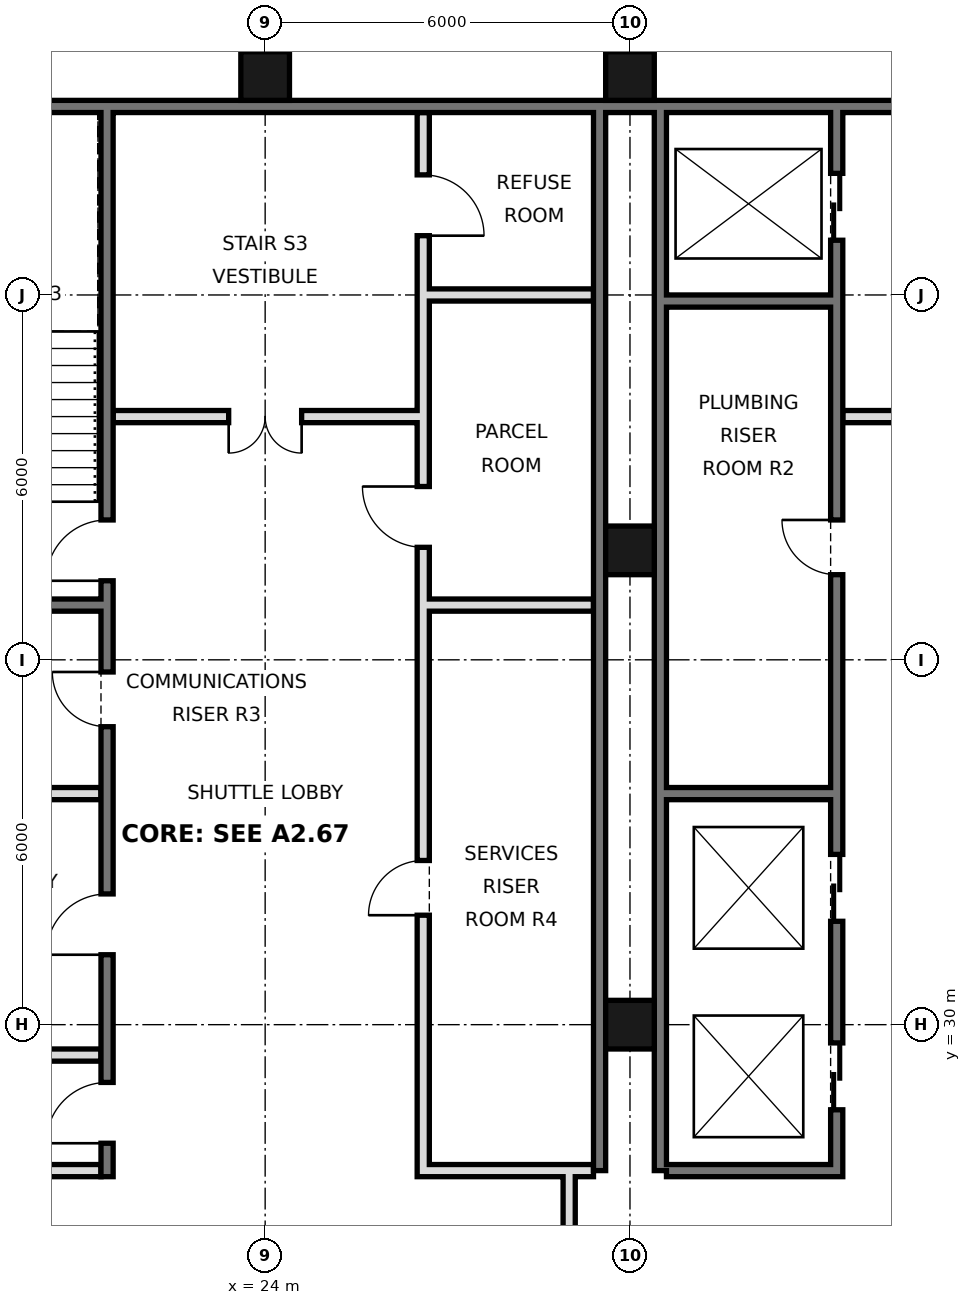
"""IFC4 building model, lengths in metres.
Left out: names, types, materials, properties, quantities, classifications, styles, units other than length and angle.
Written with IfcOpenShell. Run it as: python <this file> out.ifc"""

import sys

from ifc_helpers import new_model, si_unit, direction, frame, frame_2d, origin, origin_2d, place, context, subcontext, project, spatial, rectangle, hollow_rectangle, extrude, element, fill, save


model = new_model("IFC4")
c1 = context("Model", 3, precision=1e-05, world=origin(), true_north=direction((0.0, 1.0)))
c2 = subcontext(c1, "Body", "Model", "MODEL_VIEW")
j1 = project(units=[si_unit("LENGTHUNIT", "METRE"), si_unit("PLANEANGLEUNIT", "RADIAN")], contexts=[c1])
p1 = place(None, origin())
s1 = spatial("IfcSite", under=j1, at=p1, CompositionType="ELEMENT")
p2 = place(p1, origin())
s2 = spatial("IfcBuilding", under=s1, at=p2, CompositionType="ELEMENT")
p3 = place(p2, frame((0.0, 0.0, 266.6)))
s3 = spatial("IfcBuildingStorey", under=s2, at=p3, CompositionType="ELEMENT", Elevation=266.6)
for number, where, z_axis, x_axis in (
    (1, (24.0, 45.6, 0.0), (0.0, 0.0, 1.0), (1.0, 0.0, 0.0)),
    (2, (30.0, 30.0, 0.0), (0.0, 0.0, 1.0), (1.0, 0.0, 0.0)),
    (3, (30.0, 37.8, 0.0), (0.0, 0.0, 1.0), (1.0, 0.0, 0.0)),
    (4, (30.0, 45.6, 0.0), (0.0, 0.0, 1.0), (1.0, 0.0, 0.0)),
):
    element("IfcColumn", number, at=place(p3, frame(where, z_axis=z_axis, x_axis=x_axis)), inside=s3, PredefinedType="COLUMN", context=c2, shape_type="SweptSolid", body=[
        extrude(hollow_rectangle(XDim=0.8, YDim=0.8, WallThickness=0.032, at=origin_2d()), origin(), (0.0, 0.0, 1.0), 3.6),
    ])
p4 = place(p3, frame((6.6, 45.1, 0.0), z_axis=(0.0, 0.0, 1.0), x_axis=(1.0, 0.0, 0.0)))
e5 = element("IfcWall", 5, at=p4, inside=s3, PredefinedType="SOLIDWALL", context=c2, shape_type="SweptSolid", body=[
    extrude(rectangle(XDim=34.8, YDim=0.2, at=frame_2d((17.4, 0.0))), origin(), (0.0, 0.0, 1.0), 3.42),
])
for number, where, z_axis, x_axis in (
    (6, (29.5, 27.6, 0.0), (0.0, 0.0, 1.0), (0.0, 1.0, 0.0)),
    (7, (30.5, 27.6, 0.0), (0.0, 0.0, 1.0), (0.0, 1.0, 0.0)),
):
    element("IfcWall", number, at=place(p3, frame(where, z_axis=z_axis, x_axis=x_axis)), inside=s3, PredefinedType="SOLIDWALL", context=c2, shape_type="SweptSolid", body=[
        extrude(rectangle(XDim=17.5, YDim=0.2, at=frame_2d((8.75, 0.0))), origin(), (0.0, 0.0, 1.0), 3.42),
    ])
p5 = place(p3, frame((29.0, 21.6, 0.0), z_axis=(0.0, 0.0, 1.0), x_axis=(0.0, 1.0, 0.0)))
e8 = element("IfcWall", 8, at=p5, inside=s3, PredefinedType="PARTITIONING", context=c2, shape_type="SweptSolid", body=[
    extrude(rectangle(XDim=6.0, YDim=0.2, at=frame_2d((3.0, 0.0))), origin(), (0.0, 0.0, 1.0), 3.42),
])
p6 = place(p5, frame((2.1, 0.0, 0.0)))
e9 = element("IfcOpeningElement", 9, at=p6, cuts=e8, PredefinedType="OPENING", context=c2, shape_type="SweptSolid", body=[
    extrude(rectangle(XDim=1.8, YDim=2.1, at=frame_2d((0.9, 1.05))), frame((0.0, 0.11, 0.0), z_axis=(0.0, -1.0, 0.0), x_axis=(1.0, 0.0, 0.0)), (0.0, 0.0, 1.0), 0.22),
])
p7 = place(p3, frame((21.4, 27.5, 0.0), z_axis=(0.0, 0.0, 1.0), x_axis=(0.0, 1.0, 0.0)))
e10 = element("IfcWall", 10, at=p7, inside=s3, PredefinedType="SOLIDWALL", context=c2, shape_type="SweptSolid", body=[
    extrude(rectangle(XDim=17.5, YDim=0.2, at=frame_2d((8.75, 0.0))), origin(), (0.0, 0.0, 1.0), 3.42),
])
p8 = place(p7, frame((0.55, 0.0, 0.0)))
e11 = element("IfcOpeningElement", 11, at=p8, cuts=e10, PredefinedType="OPENING", context=c2, shape_type="SweptSolid", body=[
    extrude(rectangle(XDim=1.0, YDim=2.1, at=frame_2d((0.5, 1.05))), frame((0.0, 0.11, 0.0), z_axis=(0.0, -1.0, 0.0), x_axis=(1.0, 0.0, 0.0)), (0.0, 0.0, 1.0), 0.22),
])
p9 = place(p7, frame((3.65, 0.0, 0.0)))
e12 = element("IfcOpeningElement", 12, at=p9, cuts=e10, PredefinedType="OPENING", context=c2, shape_type="SweptSolid", body=[
    extrude(rectangle(XDim=1.0, YDim=2.1, at=frame_2d((0.5, 1.05))), frame((0.0, 0.11, 0.0), z_axis=(0.0, -1.0, 0.0), x_axis=(1.0, 0.0, 0.0)), (0.0, 0.0, 1.0), 0.22),
])
p10 = place(p7, frame((9.8, 0.0, 0.0)))
e13 = element("IfcOpeningElement", 13, at=p10, cuts=e10, PredefinedType="OPENING", context=c2, shape_type="SweptSolid", body=[
    extrude(rectangle(XDim=1.0, YDim=2.1, at=frame_2d((0.5, 1.05))), frame((0.0, 0.11, 0.0), z_axis=(0.0, -1.0, 0.0), x_axis=(1.0, 0.0, 0.0)), (0.0, 0.0, 1.0), 0.22),
])
p11 = place(p7, frame((7.4, 0.0, 0.0)))
e14 = element("IfcOpeningElement", 14, at=p11, cuts=e10, PredefinedType="OPENING", context=c2, shape_type="SweptSolid", body=[
    extrude(rectangle(XDim=0.9, YDim=2.1, at=frame_2d((0.45, 1.05))), frame((0.0, 0.11, 0.0), z_axis=(0.0, -1.0, 0.0), x_axis=(1.0, 0.0, 0.0)), (0.0, 0.0, 1.0), 0.22),
])
p12 = place(p3, frame((26.6, 27.5, 0.0), z_axis=(0.0, 0.0, 1.0), x_axis=(0.0, 1.0, 0.0)))
e15 = element("IfcWall", 15, at=p12, inside=s3, PredefinedType="SOLIDWALL", context=c2, shape_type="SweptSolid", body=[
    extrude(rectangle(XDim=17.5, YDim=0.2, at=frame_2d((8.75, 0.0))), origin(), (0.0, 0.0, 1.0), 3.42),
])
p13 = place(p12, frame((4.3, 0.0, 0.0)))
e16 = element("IfcOpeningElement", 16, at=p13, cuts=e15, PredefinedType="OPENING", context=c2, shape_type="SweptSolid", body=[
    extrude(rectangle(XDim=0.9, YDim=2.1, at=frame_2d((0.45, 1.05))), frame((0.0, 0.11, 0.0), z_axis=(0.0, -1.0, 0.0), x_axis=(1.0, 0.0, 0.0)), (0.0, 0.0, 1.0), 0.22),
])
p14 = place(p12, frame((10.35, 0.0, 0.0)))
e17 = element("IfcOpeningElement", 17, at=p14, cuts=e15, PredefinedType="OPENING", context=c2, shape_type="SweptSolid", body=[
    extrude(rectangle(XDim=1.0, YDim=2.1, at=frame_2d((0.5, 1.05))), frame((0.0, 0.11, 0.0), z_axis=(0.0, -1.0, 0.0), x_axis=(1.0, 0.0, 0.0)), (0.0, 0.0, 1.0), 0.22),
])
p15 = place(p12, frame((15.475, 0.0, 0.0)))
e18 = element("IfcOpeningElement", 18, at=p15, cuts=e15, PredefinedType="OPENING", context=c2, shape_type="SweptSolid", body=[
    extrude(rectangle(XDim=1.0, YDim=2.1, at=frame_2d((0.5, 1.05))), frame((0.0, 0.11, 0.0), z_axis=(0.0, -1.0, 0.0), x_axis=(1.0, 0.0, 0.0)), (0.0, 0.0, 1.0), 0.22),
])
p16 = place(p3, frame((33.4, 27.5, 0.0), z_axis=(0.0, 0.0, 1.0), x_axis=(0.0, 1.0, 0.0)))
e19 = element("IfcWall", 19, at=p16, inside=s3, PredefinedType="SOLIDWALL", context=c2, shape_type="SweptSolid", body=[
    extrude(rectangle(XDim=17.5, YDim=0.2, at=frame_2d((8.75, 0.0))), origin(), (0.0, 0.0, 1.0), 3.42),
])
p17 = place(p16, frame((1.1, 0.0, 0.0)))
e20 = element("IfcOpeningElement", 20, at=p17, cuts=e19, PredefinedType="OPENING", context=c2, shape_type="SweptSolid", body=[
    extrude(rectangle(XDim=1.1, YDim=2.1, at=frame_2d((0.55, 1.05))), frame((0.0, 0.11, 0.0), z_axis=(0.0, -1.0, 0.0), x_axis=(1.0, 0.0, 0.0)), (0.0, 0.0, 1.0), 0.22),
])
p18 = place(p16, frame((4.2, 0.0, 0.0)))
e21 = element("IfcOpeningElement", 21, at=p18, cuts=e19, PredefinedType="OPENING", context=c2, shape_type="SweptSolid", body=[
    extrude(rectangle(XDim=1.1, YDim=2.1, at=frame_2d((0.55, 1.05))), frame((0.0, 0.11, 0.0), z_axis=(0.0, -1.0, 0.0), x_axis=(1.0, 0.0, 0.0)), (0.0, 0.0, 1.0), 0.22),
])
p19 = place(p16, frame((15.4, 0.0, 0.0)))
e22 = element("IfcOpeningElement", 22, at=p19, cuts=e19, PredefinedType="OPENING", context=c2, shape_type="SweptSolid", body=[
    extrude(rectangle(XDim=1.1, YDim=2.1, at=frame_2d((0.55, 1.05))), frame((0.0, 0.11, 0.0), z_axis=(0.0, -1.0, 0.0), x_axis=(1.0, 0.0, 0.0)), (0.0, 0.0, 1.0), 0.22),
])
p20 = place(p16, frame((9.9, 0.0, 0.0)))
e23 = element("IfcOpeningElement", 23, at=p20, cuts=e19, PredefinedType="OPENING", context=c2, shape_type="SweptSolid", body=[
    extrude(rectangle(XDim=0.9, YDim=2.1, at=frame_2d((0.45, 1.05))), frame((0.0, 0.11, 0.0), z_axis=(0.0, -1.0, 0.0), x_axis=(1.0, 0.0, 0.0)), (0.0, 0.0, 1.0), 0.22),
])
p21 = place(p3, frame((18.6, 27.6, 0.0), z_axis=(0.0, 0.0, 1.0), x_axis=(1.0, 0.0, 0.0)))
e24 = element("IfcWall", 24, at=p21, inside=s3, PredefinedType="PARTITIONING", context=c2, shape_type="SweptSolid", body=[
    extrude(rectangle(XDim=2.7, YDim=0.2, at=frame_2d((1.35, 0.0))), origin(), (0.0, 0.0, 1.0), 3.42),
])
for number, where, z_axis, x_axis in (
    (25, (26.7, 27.6, 0.0), (0.0, 0.0, 1.0), (1.0, 0.0, 0.0)),
    (26, (30.6, 27.6, 0.0), (0.0, 0.0, 1.0), (1.0, 0.0, 0.0)),
):
    element("IfcWall", number, at=place(p3, frame(where, z_axis=z_axis, x_axis=x_axis)), inside=s3, PredefinedType="SOLIDWALL", context=c2, shape_type="SweptSolid", body=[
        extrude(rectangle(XDim=2.7, YDim=0.2, at=frame_2d((1.35, 0.0))), origin(), (0.0, 0.0, 1.0), 3.42),
    ])
p22 = place(p3, frame((18.6, 29.5, 0.0), z_axis=(0.0, 0.0, 1.0), x_axis=(1.0, 0.0, 0.0)))
e27 = element("IfcWall", 27, at=p22, inside=s3, PredefinedType="PARTITIONING", context=c2, shape_type="SweptSolid", body=[
    extrude(rectangle(XDim=2.7, YDim=0.2, at=frame_2d((1.35, 0.0))), origin(), (0.0, 0.0, 1.0), 3.42),
])
for number, where, z_axis, x_axis in (
    (28, (18.6, 33.8, 0.0), (0.0, 0.0, 1.0), (1.0, 0.0, 0.0)),
    (29, (30.6, 33.8, 0.0), (0.0, 0.0, 1.0), (1.0, 0.0, 0.0)),
    (30, (18.6, 36.9, 0.0), (0.0, 0.0, 1.0), (1.0, 0.0, 0.0)),
    (31, (26.7, 36.9, 0.0), (0.0, 0.0, 1.0), (1.0, 0.0, 0.0)),
):
    element("IfcWall", number, at=place(p3, frame(where, z_axis=z_axis, x_axis=x_axis)), inside=s3, PredefinedType="SOLIDWALL", context=c2, shape_type="SweptSolid", body=[
        extrude(rectangle(XDim=2.7, YDim=0.2, at=frame_2d((1.35, 0.0))), origin(), (0.0, 0.0, 1.0), 3.42),
    ])
p23 = place(p3, frame((21.5, 40.0, 0.0), z_axis=(0.0, 0.0, 1.0), x_axis=(1.0, 0.0, 0.0)))
e32 = element("IfcWall", 32, at=p23, inside=s3, PredefinedType="PARTITIONING", context=c2, shape_type="SweptSolid", body=[
    extrude(rectangle(XDim=5.0, YDim=0.2, at=frame_2d((2.5, 0.0))), origin(), (0.0, 0.0, 1.0), 3.42),
])
p24 = place(p23, frame((1.9, 0.0, 0.0)))
e33 = element("IfcOpeningElement", 33, at=p24, cuts=e32, PredefinedType="OPENING", context=c2, shape_type="SweptSolid", body=[
    extrude(rectangle(XDim=1.2, YDim=2.1, at=frame_2d((0.6, 1.05))), frame((0.0, 0.11, 0.0), z_axis=(0.0, -1.0, 0.0), x_axis=(1.0, 0.0, 0.0)), (0.0, 0.0, 1.0), 0.22),
])
p25 = place(p3, frame((33.5, 40.0, 0.0), z_axis=(0.0, 0.0, 1.0), x_axis=(1.0, 0.0, 0.0)))
e34 = element("IfcWall", 34, at=p25, inside=s3, PredefinedType="PARTITIONING", context=c2, shape_type="SweptSolid", body=[
    extrude(rectangle(XDim=5.0, YDim=0.2, at=frame_2d((2.5, 0.0))), origin(), (0.0, 0.0, 1.0), 3.42),
])
p26 = place(p25, frame((1.9, 0.0, 0.0)))
e35 = element("IfcOpeningElement", 35, at=p26, cuts=e34, PredefinedType="OPENING", context=c2, shape_type="SweptSolid", body=[
    extrude(rectangle(XDim=1.2, YDim=2.1, at=frame_2d((0.6, 1.05))), frame((0.0, 0.11, 0.0), z_axis=(0.0, -1.0, 0.0), x_axis=(1.0, 0.0, 0.0)), (0.0, 0.0, 1.0), 0.22),
])
p27 = place(p3, frame((30.6, 41.9, 0.0), z_axis=(0.0, 0.0, 1.0), x_axis=(1.0, 0.0, 0.0)))
e36 = element("IfcWall", 36, at=p27, inside=s3, PredefinedType="SOLIDWALL", context=c2, shape_type="SweptSolid", body=[
    extrude(rectangle(XDim=2.7, YDim=0.2, at=frame_2d((1.35, 0.0))), origin(), (0.0, 0.0, 1.0), 3.42),
])
p28 = place(p3, frame((26.7, 42.0, 0.0), z_axis=(0.0, 0.0, 1.0), x_axis=(1.0, 0.0, 0.0)))
e37 = element("IfcWall", 37, at=p28, inside=s3, PredefinedType="PARTITIONING", context=c2, shape_type="SweptSolid", body=[
    extrude(rectangle(XDim=2.7, YDim=0.2, at=frame_2d((1.35, 0.0))), origin(), (0.0, 0.0, 1.0), 3.42),
])
p29 = place(p24, frame((1.2, 0.0, 0.0), z_axis=(0.0, 0.0, 1.0), x_axis=(-1.0, 0.0, 0.0)))
e38 = element("IfcDoor", 38, at=p29, inside=s3, OperationType="DOUBLE_DOOR_SINGLE_SWING", PredefinedType="DOOR", context=c2, shape_type="SweptSolid", body=[
    extrude(rectangle(XDim=1.2, YDim=2.1, at=frame_2d((0.6, 1.05))), frame((0.0, 0.025, 0.0), z_axis=(0.0, -1.0, 0.0), x_axis=(1.0, 0.0, 0.0)), (0.0, 0.0, 1.0), 0.05),
])
fill(e33, e38)
p30 = place(p17, origin())
e39 = element("IfcDoor", 39, at=p30, inside=s3, OperationType="DOUBLE_DOOR_SLIDING", PredefinedType="DOOR", context=c2, shape_type="SweptSolid", body=[
    extrude(rectangle(XDim=1.1, YDim=2.1, at=frame_2d((0.55, 1.05))), frame((0.0, 0.025, 0.0), z_axis=(0.0, -1.0, 0.0), x_axis=(1.0, 0.0, 0.0)), (0.0, 0.0, 1.0), 0.05),
])
fill(e20, e39)
p31 = place(p18, origin())
e40 = element("IfcDoor", 40, at=p31, inside=s3, OperationType="DOUBLE_DOOR_SLIDING", PredefinedType="DOOR", context=c2, shape_type="SweptSolid", body=[
    extrude(rectangle(XDim=1.1, YDim=2.1, at=frame_2d((0.55, 1.05))), frame((0.0, 0.025, 0.0), z_axis=(0.0, -1.0, 0.0), x_axis=(1.0, 0.0, 0.0)), (0.0, 0.0, 1.0), 0.05),
])
fill(e21, e40)
p32 = place(p19, origin())
e41 = element("IfcDoor", 41, at=p32, inside=s3, OperationType="DOUBLE_DOOR_SLIDING", PredefinedType="DOOR", context=c2, shape_type="SweptSolid", body=[
    extrude(rectangle(XDim=1.1, YDim=2.1, at=frame_2d((0.55, 1.05))), frame((0.0, 0.025, 0.0), z_axis=(0.0, -1.0, 0.0), x_axis=(1.0, 0.0, 0.0)), (0.0, 0.0, 1.0), 0.05),
])
fill(e22, e41)
p33 = place(p8, origin())
e42 = element("IfcDoor", 42, at=p33, inside=s3, OperationType="SINGLE_SWING_LEFT", PredefinedType="DOOR", context=c2, shape_type="SweptSolid", body=[
    extrude(rectangle(XDim=1.0, YDim=2.1, at=frame_2d((0.5, 1.05))), frame((0.0, 0.025, 0.0), z_axis=(0.0, -1.0, 0.0), x_axis=(1.0, 0.0, 0.0)), (0.0, 0.0, 1.0), 0.05),
])
fill(e11, e42)
p34 = place(p9, origin())
e43 = element("IfcDoor", 43, at=p34, inside=s3, OperationType="SINGLE_SWING_LEFT", PredefinedType="DOOR", context=c2, shape_type="SweptSolid", body=[
    extrude(rectangle(XDim=1.0, YDim=2.1, at=frame_2d((0.5, 1.05))), frame((0.0, 0.025, 0.0), z_axis=(0.0, -1.0, 0.0), x_axis=(1.0, 0.0, 0.0)), (0.0, 0.0, 1.0), 0.05),
])
fill(e12, e43)
p35 = place(p10, origin())
e44 = element("IfcDoor", 44, at=p35, inside=s3, OperationType="SINGLE_SWING_LEFT", PredefinedType="DOOR", context=c2, shape_type="SweptSolid", body=[
    extrude(rectangle(XDim=1.0, YDim=2.1, at=frame_2d((0.5, 1.05))), frame((0.0, 0.025, 0.0), z_axis=(0.0, -1.0, 0.0), x_axis=(1.0, 0.0, 0.0)), (0.0, 0.0, 1.0), 0.05),
])
fill(e13, e44)
p36 = place(p20, frame((0.9, 0.0, 0.0), z_axis=(0.0, 0.0, 1.0), x_axis=(-1.0, 0.0, 0.0)))
e45 = element("IfcDoor", 45, at=p36, inside=s3, OperationType="SINGLE_SWING_LEFT", PredefinedType="DOOR", context=c2, shape_type="SweptSolid", body=[
    extrude(rectangle(XDim=0.9, YDim=2.1, at=frame_2d((0.45, 1.05))), frame((0.0, 0.025, 0.0), z_axis=(0.0, -1.0, 0.0), x_axis=(1.0, 0.0, 0.0)), (0.0, 0.0, 1.0), 0.05),
])
fill(e23, e45)
p37 = place(p11, frame((0.9, 0.0, 0.0), z_axis=(0.0, 0.0, 1.0), x_axis=(-1.0, 0.0, 0.0)))
e46 = element("IfcDoor", 46, at=p37, inside=s3, OperationType="SINGLE_SWING_LEFT", PredefinedType="DOOR", context=c2, shape_type="SweptSolid", body=[
    extrude(rectangle(XDim=0.9, YDim=2.1, at=frame_2d((0.45, 1.05))), frame((0.0, 0.025, 0.0), z_axis=(0.0, -1.0, 0.0), x_axis=(1.0, 0.0, 0.0)), (0.0, 0.0, 1.0), 0.05),
])
fill(e14, e46)
p38 = place(p13, origin())
e47 = element("IfcDoor", 47, at=p38, inside=s3, OperationType="SINGLE_SWING_LEFT", PredefinedType="DOOR", context=c2, shape_type="SweptSolid", body=[
    extrude(rectangle(XDim=0.9, YDim=2.1, at=frame_2d((0.45, 1.05))), frame((0.0, 0.025, 0.0), z_axis=(0.0, -1.0, 0.0), x_axis=(1.0, 0.0, 0.0)), (0.0, 0.0, 1.0), 0.05),
])
fill(e16, e47)
p39 = place(p14, frame((1.0, 0.0, 0.0), z_axis=(0.0, 0.0, 1.0), x_axis=(-1.0, 0.0, 0.0)))
e48 = element("IfcDoor", 48, at=p39, inside=s3, OperationType="SINGLE_SWING_LEFT", PredefinedType="DOOR", context=c2, shape_type="SweptSolid", body=[
    extrude(rectangle(XDim=1.0, YDim=2.1, at=frame_2d((0.5, 1.05))), frame((0.0, 0.025, 0.0), z_axis=(0.0, -1.0, 0.0), x_axis=(1.0, 0.0, 0.0)), (0.0, 0.0, 1.0), 0.05),
])
fill(e17, e48)
p40 = place(p15, frame((1.0, 0.0, 0.0), z_axis=(0.0, 0.0, 1.0), x_axis=(-1.0, 0.0, 0.0)))
e49 = element("IfcDoor", 49, at=p40, inside=s3, OperationType="SINGLE_SWING_RIGHT", PredefinedType="DOOR", context=c2, shape_type="SweptSolid", body=[
    extrude(rectangle(XDim=1.0, YDim=2.1, at=frame_2d((0.5, 1.05))), frame((0.0, 0.025, 0.0), z_axis=(0.0, -1.0, 0.0), x_axis=(1.0, 0.0, 0.0)), (0.0, 0.0, 1.0), 0.05),
])
fill(e18, e49)
save(model, sys.argv[1])
